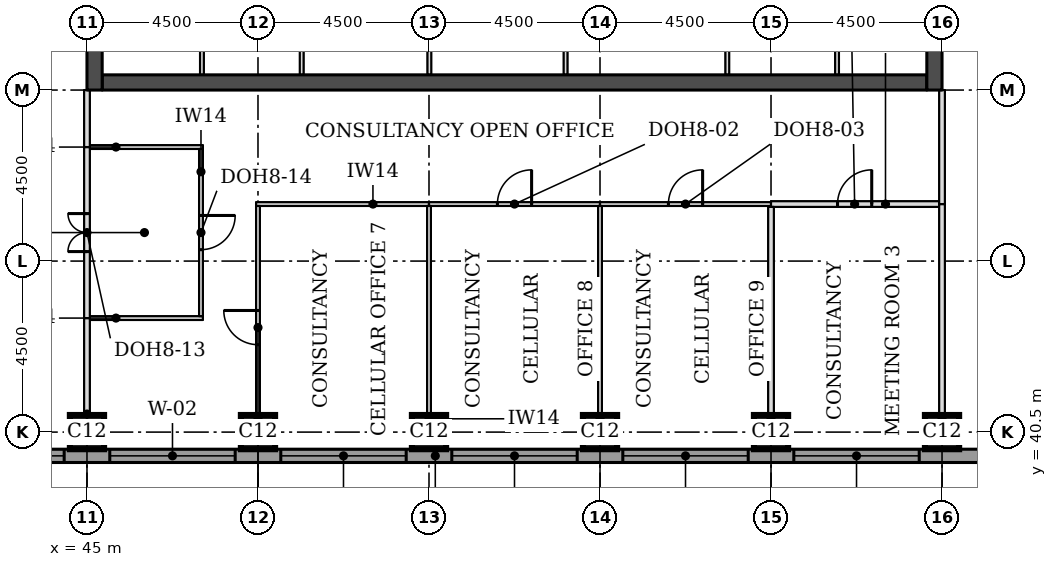
"""IFC4 building model, lengths in metres.
Left out: names, types, materials, properties, quantities, classifications, styles, units other than length and angle.
Written with IfcOpenShell. Run it as: python <this file> out.ifc"""

import sys

from ifc_helpers import new_model, si_unit, direction, frame, frame_2d, origin, origin_2d, place, context, subcontext, project, spatial, rectangle, extrude, element, fill, save


model = new_model("IFC4")
c1 = context("Model", 3, precision=1e-05, world=origin(), true_north=direction((0.0, 1.0)))
c2 = subcontext(c1, "Body", "Model", "MODEL_VIEW")
j1 = project(units=[si_unit("LENGTHUNIT", "METRE"), si_unit("PLANEANGLEUNIT", "RADIAN")], contexts=[c1])
p1 = place(None, origin())
s1 = spatial("IfcSite", under=j1, at=p1, CompositionType="ELEMENT")
p2 = place(p1, origin())
s2 = spatial("IfcBuilding", under=s1, at=p2, CompositionType="ELEMENT")
p3 = place(p2, frame((0.0, 0.0, 203.2)))
s3 = spatial("IfcBuildingStorey", under=s2, at=p3, CompositionType="ELEMENT", Elevation=203.2)
for number, where, z_axis, x_axis in (
    (1, (45.0, 40.5, 0.0), (0.0, 0.0, 1.0), (1.0, 0.0, 0.0)),
    (2, (49.5, 40.5, 0.0), (0.0, 0.0, 1.0), (1.0, 0.0, 0.0)),
    (3, (54.0, 40.5, 0.0), (0.0, 0.0, 1.0), (1.0, 0.0, 0.0)),
    (4, (58.5, 40.5, 0.0), (0.0, 0.0, 1.0), (1.0, 0.0, 0.0)),
    (5, (63.0, 40.5, 0.0), (0.0, 0.0, 1.0), (1.0, 0.0, 0.0)),
    (6, (67.5, 40.5, 0.0), (0.0, 0.0, 1.0), (1.0, 0.0, 0.0)),
):
    element("IfcColumn", number, at=place(p3, frame(where, z_axis=z_axis, x_axis=x_axis)), inside=s3, PredefinedType="COLUMN", context=c2, shape_type="SweptSolid", body=[
        extrude(rectangle(XDim=0.9, YDim=0.9, at=origin_2d()), origin(), (0.0, 0.0, 1.0), 3.7),
    ])
p4 = place(p3, frame((45.4, 49.7, 0.0), z_axis=(0.0, 0.0, 1.0), x_axis=(1.0, 0.0, 0.0)))
e7 = element("IfcWall", 7, at=p4, inside=s3, PredefinedType="SHEAR", context=c2, shape_type="SweptSolid", body=[
    extrude(rectangle(XDim=21.7, YDim=0.4, at=frame_2d((10.85, 0.0))), origin(), (0.0, 0.0, 1.0), 3.7),
])
p5 = place(p3, frame((45.2, 49.5, 0.0), z_axis=(0.0, 0.0, 1.0), x_axis=(0.0, 1.0, 0.0)))
e8 = element("IfcWall", 8, at=p5, inside=s3, PredefinedType="SHEAR", context=c2, shape_type="SweptSolid", body=[
    extrude(rectangle(XDim=22.5, YDim=0.4, at=frame_2d((11.25, 0.0))), origin(), (0.0, 0.0, 1.0), 3.7),
])
p6 = place(p5, frame((4.2, 0.0, 0.0)))
e9 = element("IfcOpeningElement", 9, at=p6, cuts=e8, PredefinedType="OPENING", context=c2, shape_type="SweptSolid", body=[
    extrude(rectangle(XDim=1.8, YDim=2.1, at=frame_2d((0.9, 1.05))), frame((0.0, 0.21, 0.0), z_axis=(0.0, -1.0, 0.0), x_axis=(1.0, 0.0, 0.0)), (0.0, 0.0, 1.0), 0.42),
])
p7 = place(p5, frame((6.9, 0.0, 0.0)))
e10 = element("IfcOpeningElement", 10, at=p7, cuts=e8, PredefinedType="OPENING", context=c2, shape_type="SweptSolid", body=[
    extrude(rectangle(XDim=1.1, YDim=2.1, at=frame_2d((0.55, 1.05))), frame((0.0, 0.21, 0.0), z_axis=(0.0, -1.0, 0.0), x_axis=(1.0, 0.0, 0.0)), (0.0, 0.0, 1.0), 0.42),
])
p8 = place(p5, frame((13.6, 0.0, 0.0)))
e11 = element("IfcOpeningElement", 11, at=p8, cuts=e8, PredefinedType="OPENING", context=c2, shape_type="SweptSolid", body=[
    extrude(rectangle(XDim=1.1, YDim=2.1, at=frame_2d((0.55, 1.05))), frame((0.0, 0.21, 0.0), z_axis=(0.0, -1.0, 0.0), x_axis=(1.0, 0.0, 0.0)), (0.0, 0.0, 1.0), 0.42),
])
p9 = place(p5, frame((16.5, 0.0, 0.0)))
e12 = element("IfcOpeningElement", 12, at=p9, cuts=e8, PredefinedType="OPENING", context=c2, shape_type="SweptSolid", body=[
    extrude(rectangle(XDim=1.8, YDim=2.1, at=frame_2d((0.9, 1.05))), frame((0.0, 0.21, 0.0), z_axis=(0.0, -1.0, 0.0), x_axis=(1.0, 0.0, 0.0)), (0.0, 0.0, 1.0), 0.42),
])
p10 = place(p3, frame((67.3, 49.5, 0.0), z_axis=(0.0, 0.0, 1.0), x_axis=(0.0, 1.0, 0.0)))
e13 = element("IfcWall", 13, at=p10, inside=s3, PredefinedType="SHEAR", context=c2, shape_type="SweptSolid", body=[
    extrude(rectangle(XDim=22.5, YDim=0.4, at=frame_2d((11.25, 0.0))), origin(), (0.0, 0.0, 1.0), 3.7),
])
p11 = place(p10, frame((4.2, 0.0, 0.0)))
e14 = element("IfcOpeningElement", 14, at=p11, cuts=e13, PredefinedType="OPENING", context=c2, shape_type="SweptSolid", body=[
    extrude(rectangle(XDim=1.8, YDim=2.1, at=frame_2d((0.9, 1.05))), frame((0.0, 0.21, 0.0), z_axis=(0.0, -1.0, 0.0), x_axis=(1.0, 0.0, 0.0)), (0.0, 0.0, 1.0), 0.42),
])
p12 = place(p10, frame((6.9, 0.0, 0.0)))
e15 = element("IfcOpeningElement", 15, at=p12, cuts=e13, PredefinedType="OPENING", context=c2, shape_type="SweptSolid", body=[
    extrude(rectangle(XDim=1.1, YDim=2.1, at=frame_2d((0.55, 1.05))), frame((0.0, 0.21, 0.0), z_axis=(0.0, -1.0, 0.0), x_axis=(1.0, 0.0, 0.0)), (0.0, 0.0, 1.0), 0.42),
])
p13 = place(p10, frame((13.6, 0.0, 0.0)))
e16 = element("IfcOpeningElement", 16, at=p13, cuts=e13, PredefinedType="OPENING", context=c2, shape_type="SweptSolid", body=[
    extrude(rectangle(XDim=1.1, YDim=2.1, at=frame_2d((0.55, 1.05))), frame((0.0, 0.21, 0.0), z_axis=(0.0, -1.0, 0.0), x_axis=(1.0, 0.0, 0.0)), (0.0, 0.0, 1.0), 0.42),
])
p14 = place(p10, frame((16.5, 0.0, 0.0)))
e17 = element("IfcOpeningElement", 17, at=p14, cuts=e13, PredefinedType="OPENING", context=c2, shape_type="SweptSolid", body=[
    extrude(rectangle(XDim=1.8, YDim=2.1, at=frame_2d((0.9, 1.05))), frame((0.0, 0.21, 0.0), z_axis=(0.0, -1.0, 0.0), x_axis=(1.0, 0.0, 0.0)), (0.0, 0.0, 1.0), 0.42),
])
p15 = place(p3, frame((36.0, 39.875, 0.0), z_axis=(0.0, 0.0, 1.0), x_axis=(1.0, 0.0, 0.0)))
e18 = element("IfcWall", 18, at=p15, inside=s3, PredefinedType="STANDARD", context=c2, shape_type="SweptSolid", body=[
    extrude(rectangle(XDim=36.331, YDim=0.35, at=frame_2d((18.166, 0.0))), origin(), (0.0, 0.0, 1.0), 3.525),
])
p16 = place(p15, frame((5.1, 0.0, 0.9)))
e19 = element("IfcOpeningElement", 19, at=p16, cuts=e18, PredefinedType="OPENING", context=c2, shape_type="SweptSolid", body=[
    extrude(rectangle(XDim=3.3, YDim=1.9, at=frame_2d((1.65, 0.95))), frame((0.0, 0.185, 0.0), z_axis=(0.0, -1.0, 0.0), x_axis=(1.0, 0.0, 0.0)), (0.0, 0.0, 1.0), 0.37),
])
p17 = place(p15, frame((9.6, 0.0, 0.9)))
e20 = element("IfcOpeningElement", 20, at=p17, cuts=e18, PredefinedType="OPENING", context=c2, shape_type="SweptSolid", body=[
    extrude(rectangle(XDim=3.3, YDim=1.9, at=frame_2d((1.65, 0.95))), frame((0.0, 0.185, 0.0), z_axis=(0.0, -1.0, 0.0), x_axis=(1.0, 0.0, 0.0)), (0.0, 0.0, 1.0), 0.37),
])
p18 = place(p15, frame((14.1, 0.0, 0.9)))
e21 = element("IfcOpeningElement", 21, at=p18, cuts=e18, PredefinedType="OPENING", context=c2, shape_type="SweptSolid", body=[
    extrude(rectangle(XDim=3.3, YDim=1.9, at=frame_2d((1.65, 0.95))), frame((0.0, 0.185, 0.0), z_axis=(0.0, -1.0, 0.0), x_axis=(1.0, 0.0, 0.0)), (0.0, 0.0, 1.0), 0.37),
])
p19 = place(p15, frame((18.6, 0.0, 0.9)))
e22 = element("IfcOpeningElement", 22, at=p19, cuts=e18, PredefinedType="OPENING", context=c2, shape_type="SweptSolid", body=[
    extrude(rectangle(XDim=3.3, YDim=1.9, at=frame_2d((1.65, 0.95))), frame((0.0, 0.185, 0.0), z_axis=(0.0, -1.0, 0.0), x_axis=(1.0, 0.0, 0.0)), (0.0, 0.0, 1.0), 0.37),
])
p20 = place(p15, frame((23.1, 0.0, 0.9)))
e23 = element("IfcOpeningElement", 23, at=p20, cuts=e18, PredefinedType="OPENING", context=c2, shape_type="SweptSolid", body=[
    extrude(rectangle(XDim=3.3, YDim=1.9, at=frame_2d((1.65, 0.95))), frame((0.0, 0.185, 0.0), z_axis=(0.0, -1.0, 0.0), x_axis=(1.0, 0.0, 0.0)), (0.0, 0.0, 1.0), 0.37),
])
p21 = place(p15, frame((27.6, 0.0, 0.9)))
e24 = element("IfcOpeningElement", 24, at=p21, cuts=e18, PredefinedType="OPENING", context=c2, shape_type="SweptSolid", body=[
    extrude(rectangle(XDim=3.3, YDim=1.9, at=frame_2d((1.65, 0.95))), frame((0.0, 0.185, 0.0), z_axis=(0.0, -1.0, 0.0), x_axis=(1.0, 0.0, 0.0)), (0.0, 0.0, 1.0), 0.37),
])
p22 = place(p3, frame((45.075, 43.5, 0.0), z_axis=(0.0, 0.0, 1.0), x_axis=(1.0, 0.0, 0.0)))
e25 = element("IfcWall", 25, at=p22, inside=s3, PredefinedType="PARTITIONING", context=c2, shape_type="SweptSolid", body=[
    extrude(rectangle(XDim=2.975, YDim=0.1, at=frame_2d((1.488, 0.0))), origin(), (0.0, 0.0, 1.0), 3.55),
])
p23 = place(p3, frame((49.45, 46.5, 0.0), z_axis=(0.0, 0.0, 1.0), x_axis=(1.0, 0.0, 0.0)))
e26 = element("IfcWall", 26, at=p23, inside=s3, PredefinedType="PARTITIONING", context=c2, shape_type="SweptSolid", body=[
    extrude(rectangle(XDim=4.55, YDim=0.1, at=frame_2d((2.275, 0.0))), origin(), (0.0, 0.0, 1.0), 3.55),
])
p24 = place(p3, frame((54.0, 46.5, 0.0), z_axis=(0.0, 0.0, 1.0), x_axis=(1.0, 0.0, 0.0)))
e27 = element("IfcWall", 27, at=p24, inside=s3, PredefinedType="PARTITIONING", context=c2, shape_type="SweptSolid", body=[
    extrude(rectangle(XDim=4.5, YDim=0.1, at=frame_2d((2.25, 0.0))), origin(), (0.0, 0.0, 1.0), 3.55),
])
p25 = place(p24, frame((1.8, 0.0, 0.0)))
e28 = element("IfcOpeningElement", 28, at=p25, cuts=e27, PredefinedType="OPENING", context=c2, shape_type="SweptSolid", body=[
    extrude(rectangle(XDim=0.9, YDim=2.1, at=frame_2d((0.45, 1.05))), frame((0.0, 0.06, 0.0), z_axis=(0.0, -1.0, 0.0), x_axis=(1.0, 0.0, 0.0)), (0.0, 0.0, 1.0), 0.12),
])
p26 = place(p3, frame((58.5, 46.5, 0.0), z_axis=(0.0, 0.0, 1.0), x_axis=(1.0, 0.0, 0.0)))
e29 = element("IfcWall", 29, at=p26, inside=s3, PredefinedType="PARTITIONING", context=c2, shape_type="SweptSolid", body=[
    extrude(rectangle(XDim=4.5, YDim=0.1, at=frame_2d((2.25, 0.0))), origin(), (0.0, 0.0, 1.0), 3.55),
])
p27 = place(p26, frame((1.8, 0.0, 0.0)))
e30 = element("IfcOpeningElement", 30, at=p27, cuts=e29, PredefinedType="OPENING", context=c2, shape_type="SweptSolid", body=[
    extrude(rectangle(XDim=0.9, YDim=2.1, at=frame_2d((0.45, 1.05))), frame((0.0, 0.06, 0.0), z_axis=(0.0, -1.0, 0.0), x_axis=(1.0, 0.0, 0.0)), (0.0, 0.0, 1.0), 0.12),
])
p28 = place(p3, frame((63.0, 46.5, 0.0), z_axis=(0.0, 0.0, 1.0), x_axis=(1.0, 0.0, 0.0)))
e31 = element("IfcWall", 31, at=p28, inside=s3, PredefinedType="PARTITIONING", context=c2, shape_type="SweptSolid", body=[
    extrude(rectangle(XDim=4.425, YDim=0.15, at=frame_2d((2.212, 0.0))), origin(), (0.0, 0.0, 1.0), 3.55),
])
p29 = place(p28, frame((1.75, 0.0, 0.0)))
e32 = element("IfcOpeningElement", 32, at=p29, cuts=e31, PredefinedType="OPENING", context=c2, shape_type="SweptSolid", body=[
    extrude(rectangle(XDim=0.9, YDim=2.1, at=frame_2d((0.45, 1.05))), frame((0.0, 0.085, 0.0), z_axis=(0.0, -1.0, 0.0), x_axis=(1.0, 0.0, 0.0)), (0.0, 0.0, 1.0), 0.17),
])
p30 = place(p3, frame((45.075, 48.0, 0.0), z_axis=(0.0, 0.0, 1.0), x_axis=(1.0, 0.0, 0.0)))
e33 = element("IfcWall", 33, at=p30, inside=s3, PredefinedType="PARTITIONING", context=c2, shape_type="SweptSolid", body=[
    extrude(rectangle(XDim=2.975, YDim=0.1, at=frame_2d((1.488, 0.0))), origin(), (0.0, 0.0, 1.0), 3.55),
])
p31 = place(p3, frame((45.0, 40.05, 0.0), z_axis=(0.0, 0.0, 1.0), x_axis=(0.0, 1.0, 0.0)))
e34 = element("IfcWall", 34, at=p31, inside=s3, PredefinedType="PARTITIONING", context=c2, shape_type="SweptSolid", body=[
    extrude(rectangle(XDim=3.45, YDim=0.15, at=frame_2d((1.725, 0.0))), origin(), (0.0, 0.0, 1.0), 2.938),
])
p32 = place(p3, frame((49.5, 40.05, 0.0), z_axis=(0.0, 0.0, 1.0), x_axis=(0.0, 1.0, 0.0)))
e35 = element("IfcWall", 35, at=p32, inside=s3, PredefinedType="PARTITIONING", context=c2, shape_type="SweptSolid", body=[
    extrude(rectangle(XDim=6.4, YDim=0.1, at=frame_2d((3.2, 0.0))), origin(), (0.0, 0.0, 1.0), 3.55),
])
p33 = place(p32, frame((2.75, 0.0, 0.0)))
e36 = element("IfcOpeningElement", 36, at=p33, cuts=e35, PredefinedType="OPENING", context=c2, shape_type="SweptSolid", body=[
    extrude(rectangle(XDim=0.9, YDim=2.1, at=frame_2d((0.45, 1.05))), frame((0.0, 0.06, 0.0), z_axis=(0.0, -1.0, 0.0), x_axis=(1.0, 0.0, 0.0)), (0.0, 0.0, 1.0), 0.12),
])
for number, where, z_axis, x_axis in (
    (37, (54.0, 40.05, 0.0), (0.0, 0.0, 1.0), (0.0, 1.0, 0.0)),
    (38, (58.5, 40.05, 0.0), (0.0, 0.0, 1.0), (0.0, 1.0, 0.0)),
):
    element("IfcWall", number, at=place(p3, frame(where, z_axis=z_axis, x_axis=x_axis)), inside=s3, PredefinedType="PARTITIONING", context=c2, shape_type="SweptSolid", body=[
        extrude(rectangle(XDim=6.4, YDim=0.1, at=frame_2d((3.2, 0.0))), origin(), (0.0, 0.0, 1.0), 3.55),
    ])
p34 = place(p3, frame((63.0, 40.05, 0.0), z_axis=(0.0, 0.0, 1.0), x_axis=(0.0, 1.0, 0.0)))
e39 = element("IfcWall", 39, at=p34, inside=s3, PredefinedType="PARTITIONING", context=c2, shape_type="SweptSolid", body=[
    extrude(rectangle(XDim=6.375, YDim=0.15, at=frame_2d((3.188, 0.0))), origin(), (0.0, 0.0, 1.0), 3.55),
])
p35 = place(p3, frame((67.5, 40.05, 0.0), z_axis=(0.0, 0.0, 1.0), x_axis=(0.0, 1.0, 0.0)))
e40 = element("IfcWall", 40, at=p35, inside=s3, PredefinedType="PARTITIONING", context=c2, shape_type="SweptSolid", body=[
    extrude(rectangle(XDim=6.45, YDim=0.15, at=frame_2d((3.225, 0.0))), origin(), (0.0, 0.0, 1.0), 2.938),
])
p36 = place(p3, frame((45.0, 43.5, 0.0), z_axis=(0.0, 0.0, 1.0), x_axis=(0.0, 1.0, 0.0)))
e41 = element("IfcWall", 41, at=p36, inside=s3, PredefinedType="PARTITIONING", context=c2, shape_type="SweptSolid", body=[
    extrude(rectangle(XDim=4.5, YDim=0.15, at=frame_2d((2.25, 0.0))), origin(), (0.0, 0.0, 1.0), 2.938),
])
p37 = place(p36, frame((1.75, 0.0, 0.0)))
e42 = element("IfcOpeningElement", 42, at=p37, cuts=e41, PredefinedType="OPENING", context=c2, shape_type="SweptSolid", body=[
    extrude(rectangle(XDim=1.0, YDim=2.1, at=frame_2d((0.5, 1.05))), frame((0.0, 0.085, 0.0), z_axis=(0.0, -1.0, 0.0), x_axis=(1.0, 0.0, 0.0)), (0.0, 0.0, 1.0), 0.17),
])
p38 = place(p3, frame((48.0, 43.55, 0.0), z_axis=(0.0, 0.0, 1.0), x_axis=(0.0, 1.0, 0.0)))
e43 = element("IfcWall", 43, at=p38, inside=s3, PredefinedType="PARTITIONING", context=c2, shape_type="SweptSolid", body=[
    extrude(rectangle(XDim=4.4, YDim=0.1, at=frame_2d((2.2, 0.0))), origin(), (0.0, 0.0, 1.0), 3.55),
])
p39 = place(p38, frame((1.75, 0.0, 0.0)))
e44 = element("IfcOpeningElement", 44, at=p39, cuts=e43, PredefinedType="OPENING", context=c2, shape_type="SweptSolid", body=[
    extrude(rectangle(XDim=0.9, YDim=2.1, at=frame_2d((0.45, 1.05))), frame((0.0, 0.06, 0.0), z_axis=(0.0, -1.0, 0.0), x_axis=(1.0, 0.0, 0.0)), (0.0, 0.0, 1.0), 0.12),
])
p40 = place(p3, frame((67.5, 46.5, 0.0), z_axis=(0.0, 0.0, 1.0), x_axis=(0.0, 1.0, 0.0)))
e45 = element("IfcWall", 45, at=p40, inside=s3, PredefinedType="PARTITIONING", context=c2, shape_type="SweptSolid", body=[
    extrude(rectangle(XDim=3.0, YDim=0.15, at=frame_2d((1.5, 0.0))), origin(), (0.0, 0.0, 1.0), 2.938),
])
p41 = place(p3, frame((45.0, 48.0, 0.0), z_axis=(0.0, 0.0, 1.0), x_axis=(0.0, 1.0, 0.0)))
e46 = element("IfcWall", 46, at=p41, inside=s3, PredefinedType="PARTITIONING", context=c2, shape_type="SweptSolid", body=[
    extrude(rectangle(XDim=1.5, YDim=0.15, at=frame_2d((0.75, 0.0))), origin(), (0.0, 0.0, 1.0), 2.938),
])
for number, where, z_axis, x_axis in (
    (47, (48.025, 49.9, 0.0), (0.0, 0.0, 1.0), (0.0, 1.0, 0.0)),
    (48, (50.65, 49.9, 0.0), (0.0, 0.0, 1.0), (0.0, 1.0, 0.0)),
    (49, (54.01, 49.9, 0.0), (0.0, 0.0, 1.0), (0.0, 1.0, 0.0)),
    (50, (57.594, 49.9, 0.0), (0.0, 0.0, 1.0), (0.0, 1.0, 0.0)),
    (51, (61.85, 49.9, 0.0), (0.0, 0.0, 1.0), (0.0, 1.0, 0.0)),
    (52, (64.738, 49.9, 0.0), (0.0, 0.0, 1.0), (0.0, 1.0, 0.0)),
):
    element("IfcWall", number, at=place(p3, frame(where, z_axis=z_axis, x_axis=x_axis)), inside=s3, PredefinedType="PARTITIONING", context=c2, shape_type="SweptSolid", body=[
        extrude(rectangle(XDim=3.1, YDim=0.1, at=frame_2d((1.55, 0.0))), origin(), (0.0, 0.0, 1.0), 3.55),
    ])
p42 = place(p16, origin())
e53 = element("IfcWindow", 53, at=p42, inside=s3, PartitioningType="SINGLE_PANEL", PredefinedType="WINDOW", context=c2, shape_type="SweptSolid", body=[
    extrude(rectangle(XDim=3.3, YDim=1.9, at=frame_2d((1.65, 0.95))), frame((0.0, 0.085, 0.0), z_axis=(0.0, -1.0, 0.0), x_axis=(1.0, 0.0, 0.0)), (0.0, 0.0, 1.0), 0.06),
])
fill(e19, e53)
p43 = place(p17, origin())
e54 = element("IfcWindow", 54, at=p43, inside=s3, PartitioningType="SINGLE_PANEL", PredefinedType="WINDOW", context=c2, shape_type="SweptSolid", body=[
    extrude(rectangle(XDim=3.3, YDim=1.9, at=frame_2d((1.65, 0.95))), frame((0.0, 0.085, 0.0), z_axis=(0.0, -1.0, 0.0), x_axis=(1.0, 0.0, 0.0)), (0.0, 0.0, 1.0), 0.06),
])
fill(e20, e54)
p44 = place(p18, origin())
e55 = element("IfcWindow", 55, at=p44, inside=s3, PartitioningType="SINGLE_PANEL", PredefinedType="WINDOW", context=c2, shape_type="SweptSolid", body=[
    extrude(rectangle(XDim=3.3, YDim=1.9, at=frame_2d((1.65, 0.95))), frame((0.0, 0.085, 0.0), z_axis=(0.0, -1.0, 0.0), x_axis=(1.0, 0.0, 0.0)), (0.0, 0.0, 1.0), 0.06),
])
fill(e21, e55)
p45 = place(p19, origin())
e56 = element("IfcWindow", 56, at=p45, inside=s3, PartitioningType="SINGLE_PANEL", PredefinedType="WINDOW", context=c2, shape_type="SweptSolid", body=[
    extrude(rectangle(XDim=3.3, YDim=1.9, at=frame_2d((1.65, 0.95))), frame((0.0, 0.085, 0.0), z_axis=(0.0, -1.0, 0.0), x_axis=(1.0, 0.0, 0.0)), (0.0, 0.0, 1.0), 0.06),
])
fill(e22, e56)
p46 = place(p20, origin())
e57 = element("IfcWindow", 57, at=p46, inside=s3, PartitioningType="SINGLE_PANEL", PredefinedType="WINDOW", context=c2, shape_type="SweptSolid", body=[
    extrude(rectangle(XDim=3.3, YDim=1.9, at=frame_2d((1.65, 0.95))), frame((0.0, 0.085, 0.0), z_axis=(0.0, -1.0, 0.0), x_axis=(1.0, 0.0, 0.0)), (0.0, 0.0, 1.0), 0.06),
])
fill(e23, e57)
p47 = place(p21, origin())
e58 = element("IfcWindow", 58, at=p47, inside=s3, PartitioningType="SINGLE_PANEL", PredefinedType="WINDOW", context=c2, shape_type="SweptSolid", body=[
    extrude(rectangle(XDim=3.3, YDim=1.9, at=frame_2d((1.65, 0.95))), frame((0.0, 0.085, 0.0), z_axis=(0.0, -1.0, 0.0), x_axis=(1.0, 0.0, 0.0)), (0.0, 0.0, 1.0), 0.06),
])
fill(e24, e58)
p48 = place(p37, origin())
e59 = element("IfcDoor", 59, at=p48, inside=s3, OperationType="DOUBLE_DOOR_SINGLE_SWING", PredefinedType="DOOR", context=c2, shape_type="SweptSolid", body=[
    extrude(rectangle(XDim=1.0, YDim=2.1, at=frame_2d((0.5, 1.05))), frame((0.0, 0.025, 0.0), z_axis=(0.0, -1.0, 0.0), x_axis=(1.0, 0.0, 0.0)), (0.0, 0.0, 1.0), 0.05),
])
fill(e42, e59)
p49 = place(p39, frame((0.9, 0.0, 0.0), z_axis=(0.0, 0.0, 1.0), x_axis=(-1.0, 0.0, 0.0)))
e60 = element("IfcDoor", 60, at=p49, inside=s3, OperationType="SINGLE_SWING_LEFT", PredefinedType="DOOR", context=c2, shape_type="SweptSolid", body=[
    extrude(rectangle(XDim=0.9, YDim=2.1, at=frame_2d((0.45, 1.05))), frame((0.0, 0.025, 0.0), z_axis=(0.0, -1.0, 0.0), x_axis=(1.0, 0.0, 0.0)), (0.0, 0.0, 1.0), 0.05),
])
fill(e44, e60)
p50 = place(p33, origin())
e61 = element("IfcDoor", 61, at=p50, inside=s3, OperationType="SINGLE_SWING_RIGHT", PredefinedType="DOOR", context=c2, shape_type="SweptSolid", body=[
    extrude(rectangle(XDim=0.9, YDim=2.1, at=frame_2d((0.45, 1.05))), frame((0.0, 0.025, 0.0), z_axis=(0.0, -1.0, 0.0), x_axis=(1.0, 0.0, 0.0)), (0.0, 0.0, 1.0), 0.05),
])
fill(e36, e61)
p51 = place(p25, origin())
e62 = element("IfcDoor", 62, at=p51, inside=s3, OperationType="SINGLE_SWING_RIGHT", PredefinedType="DOOR", context=c2, shape_type="SweptSolid", body=[
    extrude(rectangle(XDim=0.9, YDim=2.1, at=frame_2d((0.45, 1.05))), frame((0.0, 0.025, 0.0), z_axis=(0.0, -1.0, 0.0), x_axis=(1.0, 0.0, 0.0)), (0.0, 0.0, 1.0), 0.05),
])
fill(e28, e62)
p52 = place(p27, origin())
e63 = element("IfcDoor", 63, at=p52, inside=s3, OperationType="SINGLE_SWING_RIGHT", PredefinedType="DOOR", context=c2, shape_type="SweptSolid", body=[
    extrude(rectangle(XDim=0.9, YDim=2.1, at=frame_2d((0.45, 1.05))), frame((0.0, 0.025, 0.0), z_axis=(0.0, -1.0, 0.0), x_axis=(1.0, 0.0, 0.0)), (0.0, 0.0, 1.0), 0.05),
])
fill(e30, e63)
p53 = place(p29, origin())
e64 = element("IfcDoor", 64, at=p53, inside=s3, OperationType="SINGLE_SWING_RIGHT", PredefinedType="DOOR", context=c2, shape_type="SweptSolid", body=[
    extrude(rectangle(XDim=0.9, YDim=2.1, at=frame_2d((0.45, 1.05))), frame((0.0, 0.025, 0.0), z_axis=(0.0, -1.0, 0.0), x_axis=(1.0, 0.0, 0.0)), (0.0, 0.0, 1.0), 0.05),
])
fill(e32, e64)
save(model, sys.argv[1])
